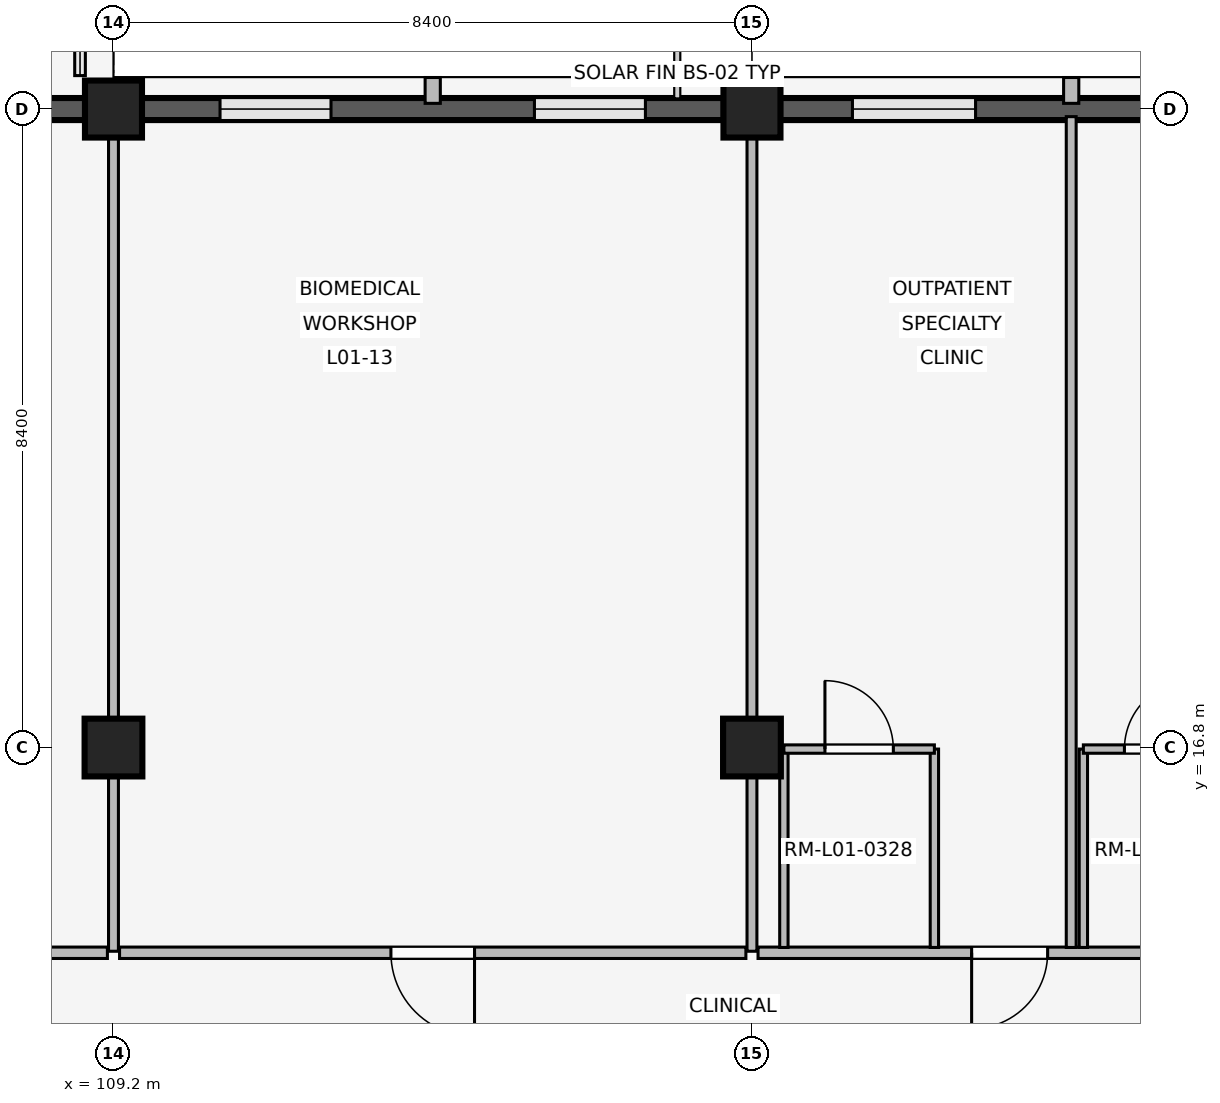
"""IFC4 building model, lengths in metres.
Left out: names, types, materials, properties, quantities, classifications, styles, units other than length and angle.
Written with IfcOpenShell. Run it as: python <this file> out.ifc"""

import sys

from ifc_helpers import new_model, si_unit, direction, frame, frame_2d, origin, origin_2d, place, context, subcontext, project, spatial, rectangle, extrude, element, fill, save


model = new_model("IFC4")
c1 = context("Model", 3, precision=1e-05, world=origin(), true_north=direction((0.0, 1.0)))
c2 = subcontext(c1, "Body", "Model", "MODEL_VIEW")
j1 = project(units=[si_unit("LENGTHUNIT", "METRE"), si_unit("PLANEANGLEUNIT", "RADIAN")], contexts=[c1])
p1 = place(None, origin())
s1 = spatial("IfcSite", under=j1, at=p1, CompositionType="ELEMENT")
p2 = place(p1, origin())
s2 = spatial("IfcBuilding", under=s1, at=p2, CompositionType="ELEMENT")
p3 = place(p2, frame((0.0, 0.0, 4.8)))
s3 = spatial("IfcBuildingStorey", under=s2, at=p3, CompositionType="ELEMENT", Elevation=4.8)
p4 = place(p3, frame((109.2, 16.8, 0.0), z_axis=(0.0, 0.0, 1.0), x_axis=(1.0, 0.0, 0.0)))
e1 = element("IfcColumn", 1, at=p4, inside=s3, PredefinedType="COLUMN", context=c2, shape_type="SweptSolid", body=[
    extrude(rectangle(XDim=0.76, YDim=0.76, at=origin_2d()), origin(), (0.0, 0.0, 1.0), 3.3),
])
p5 = place(p3, frame((109.2, 25.2, 0.0), z_axis=(0.0, 0.0, 1.0), x_axis=(1.0, 0.0, 0.0)))
e2 = element("IfcColumn", 2, at=p5, inside=s3, PredefinedType="COLUMN", context=c2, shape_type="SweptSolid", body=[
    extrude(rectangle(XDim=0.75, YDim=0.75, at=origin_2d()), origin(), (0.0, 0.0, 1.0), 3.3),
])
p6 = place(p3, frame((117.6, 16.8, 0.0), z_axis=(0.0, 0.0, 1.0), x_axis=(1.0, 0.0, 0.0)))
e3 = element("IfcColumn", 3, at=p6, inside=s3, PredefinedType="COLUMN", context=c2, shape_type="SweptSolid", body=[
    extrude(rectangle(XDim=0.76, YDim=0.76, at=origin_2d()), origin(), (0.0, 0.0, 1.0), 3.3),
])
p7 = place(p3, frame((117.6, 25.2, 0.0), z_axis=(0.0, 0.0, 1.0), x_axis=(1.0, 0.0, 0.0)))
e4 = element("IfcColumn", 4, at=p7, inside=s3, PredefinedType="COLUMN", context=c2, shape_type="SweptSolid", body=[
    extrude(rectangle(XDim=0.75, YDim=0.75, at=origin_2d()), origin(), (0.0, 0.0, 1.0), 3.3),
])
p8 = place(p3, frame((101.17, 25.2, 0.0), z_axis=(0.0, 0.0, 1.0), x_axis=(1.0, 0.0, 0.0)))
e5 = element("IfcWall", 5, at=p8, inside=s3, PredefinedType="SOLIDWALL", context=c2, shape_type="SweptSolid", body=[
    extrude(rectangle(XDim=7.66, YDim=0.29, at=frame_2d((3.83, 0.0))), origin(), (0.0, 0.0, 1.0), 2.42),
])
p9 = place(p8, frame((2.88, 0.0, 0.0)))
e6 = element("IfcOpeningElement", 6, at=p9, cuts=e5, PredefinedType="OPENING", context=c2, shape_type="SweptSolid", body=[
    extrude(rectangle(XDim=1.9, YDim=2.3, at=frame_2d((0.95, 1.15))), frame((0.0, 0.155, 0.0), z_axis=(0.0, -1.0, 0.0), x_axis=(1.0, 0.0, 0.0)), (0.0, 0.0, 1.0), 0.31),
])
p10 = place(p3, frame((109.57, 25.2, 0.0), z_axis=(0.0, 0.0, 1.0), x_axis=(1.0, 0.0, 0.0)))
e7 = element("IfcWall", 7, at=p10, inside=s3, PredefinedType="SOLIDWALL", context=c2, shape_type="SweptSolid", body=[
    extrude(rectangle(XDim=7.66, YDim=0.29, at=frame_2d((3.83, 0.0))), origin(), (0.0, 0.0, 1.0), 2.42),
])
p11 = place(p10, frame((1.032, 0.0, 0.85)))
e8 = element("IfcOpeningElement", 8, at=p11, cuts=e7, PredefinedType="OPENING", context=c2, shape_type="SweptSolid", body=[
    extrude(rectangle(XDim=1.46, YDim=0.85, at=frame_2d((0.73, 0.425))), frame((0.0, 0.155, 0.0), z_axis=(0.0, -1.0, 0.0), x_axis=(1.0, 0.0, 0.0)), (0.0, 0.0, 1.0), 0.31),
])
p12 = place(p10, frame((5.168, 0.0, 0.85)))
e9 = element("IfcOpeningElement", 9, at=p12, cuts=e7, PredefinedType="OPENING", context=c2, shape_type="SweptSolid", body=[
    extrude(rectangle(XDim=1.46, YDim=0.85, at=frame_2d((0.73, 0.425))), frame((0.0, 0.155, 0.0), z_axis=(0.0, -1.0, 0.0), x_axis=(1.0, 0.0, 0.0)), (0.0, 0.0, 1.0), 0.31),
])
p13 = place(p3, frame((113.4, 25.275, 0.0), z_axis=(0.0, 0.0, 1.0), x_axis=(0.0, 1.0, 0.0)))
e10 = element("IfcWall", 10, at=p13, inside=s3, PredefinedType="ELEMENTEDWALL", context=c2, shape_type="SweptSolid", body=[
    extrude(rectangle(XDim=0.34, YDim=0.2, at=frame_2d((0.17, 0.0))), origin(), (0.0, 0.0, 1.0), 2.4),
])
p14 = place(p3, frame((117.97, 25.2, 0.0), z_axis=(0.0, 0.0, 1.0), x_axis=(1.0, 0.0, 0.0)))
e11 = element("IfcWall", 11, at=p14, inside=s3, PredefinedType="SOLIDWALL", context=c2, shape_type="SweptSolid", body=[
    extrude(rectangle(XDim=7.66, YDim=0.29, at=frame_2d((3.83, 0.0))), origin(), (0.0, 0.0, 1.0), 2.42),
])
p15 = place(p14, frame((0.952, 0.0, 0.85)))
e12 = element("IfcOpeningElement", 12, at=p15, cuts=e11, PredefinedType="OPENING", context=c2, shape_type="SweptSolid", body=[
    extrude(rectangle(XDim=1.62, YDim=0.95, at=frame_2d((0.81, 0.475))), frame((0.0, 0.155, 0.0), z_axis=(0.0, -1.0, 0.0), x_axis=(1.0, 0.0, 0.0)), (0.0, 0.0, 1.0), 0.31),
])
p16 = place(p14, frame((5.088, 0.0, 0.85)))
e13 = element("IfcOpeningElement", 13, at=p16, cuts=e11, PredefinedType="OPENING", context=c2, shape_type="SweptSolid", body=[
    extrude(rectangle(XDim=1.62, YDim=0.95, at=frame_2d((0.81, 0.475))), frame((0.0, 0.155, 0.0), z_axis=(0.0, -1.0, 0.0), x_axis=(1.0, 0.0, 0.0)), (0.0, 0.0, 1.0), 0.31),
])
p17 = place(p3, frame((121.8, 25.275, 0.0), z_axis=(0.0, 0.0, 1.0), x_axis=(0.0, 1.0, 0.0)))
e14 = element("IfcWall", 14, at=p17, inside=s3, PredefinedType="ELEMENTEDWALL", context=c2, shape_type="SweptSolid", body=[
    extrude(rectangle(XDim=0.34, YDim=0.2, at=frame_2d((0.17, 0.0))), origin(), (0.0, 0.0, 1.0), 2.4),
])
p18 = place(p3, frame((109.12, 14.1, 0.0), z_axis=(0.0, 0.0, 1.0), x_axis=(-1.0, 0.0, 0.0)))
e15 = element("IfcWall", 15, at=p18, inside=s3, PredefinedType="PARTITIONING", context=c2, shape_type="SweptSolid", body=[
    extrude(rectangle(XDim=7.96, YDim=0.15, at=frame_2d((3.98, 0.0))), origin(), (0.0, 0.0, 1.0), 2.4),
])
p19 = place(p18, frame((1.15, 0.0, 0.0)))
e16 = element("IfcOpeningElement", 16, at=p19, cuts=e15, PredefinedType="OPENING", context=c2, shape_type="SweptSolid", body=[
    extrude(rectangle(XDim=1.9, YDim=2.3, at=frame_2d((0.95, 1.15))), frame((0.0, 0.085, 0.0), z_axis=(0.0, -1.0, 0.0), x_axis=(1.0, 0.0, 0.0)), (0.0, 0.0, 1.0), 0.17),
])
p20 = place(p3, frame((109.2, 14.12, 0.0), z_axis=(0.0, 0.0, 1.0), x_axis=(0.0, 1.0, 0.0)))
e17 = element("IfcWall", 17, at=p20, inside=s3, PredefinedType="PARTITIONING", context=c2, shape_type="SweptSolid", body=[
    extrude(rectangle(XDim=10.94, YDim=0.13, at=frame_2d((5.47, 0.0))), origin(), (0.0, 0.0, 1.0), 2.4),
])
p21 = place(p3, frame((117.52, 14.1, 0.0), z_axis=(0.0, 0.0, 1.0), x_axis=(-1.0, 0.0, 0.0)))
e18 = element("IfcWall", 18, at=p21, inside=s3, PredefinedType="PARTITIONING", context=c2, shape_type="SweptSolid", body=[
    extrude(rectangle(XDim=8.24, YDim=0.15, at=frame_2d((4.12, 0.0))), origin(), (0.0, 0.0, 1.0), 2.4),
])
p22 = place(p21, frame((3.57, 0.0, 0.0)))
e19 = element("IfcOpeningElement", 19, at=p22, cuts=e18, PredefinedType="OPENING", context=c2, shape_type="SweptSolid", body=[
    extrude(rectangle(XDim=1.1, YDim=2.2, at=frame_2d((0.55, 1.1))), frame((0.0, 0.085, 0.0), z_axis=(0.0, -1.0, 0.0), x_axis=(1.0, 0.0, 0.0)), (0.0, 0.0, 1.0), 0.17),
])
p23 = place(p3, frame((117.6, 14.12, 0.0), z_axis=(0.0, 0.0, 1.0), x_axis=(0.0, 1.0, 0.0)))
e20 = element("IfcWall", 20, at=p23, inside=s3, PredefinedType="PARTITIONING", context=c2, shape_type="SweptSolid", body=[
    extrude(rectangle(XDim=10.94, YDim=0.13, at=frame_2d((5.47, 0.0))), origin(), (0.0, 0.0, 1.0), 2.4),
])
p24 = place(p3, frame((125.92, 14.1, 0.0), z_axis=(0.0, 0.0, 1.0), x_axis=(-1.0, 0.0, 0.0)))
e21 = element("IfcWall", 21, at=p24, inside=s3, PredefinedType="PARTITIONING", context=c2, shape_type="SweptSolid", body=[
    extrude(rectangle(XDim=8.24, YDim=0.15, at=frame_2d((4.12, 0.0))), origin(), (0.0, 0.0, 1.0), 2.4),
])
p25 = place(p24, frame((0.73, 0.0, 0.0)))
e22 = element("IfcOpeningElement", 22, at=p25, cuts=e21, PredefinedType="OPENING", context=c2, shape_type="SweptSolid", body=[
    extrude(rectangle(XDim=1.0, YDim=2.15, at=frame_2d((0.5, 1.075))), frame((0.0, 0.085, 0.0), z_axis=(0.0, -1.0, 0.0), x_axis=(1.0, 0.0, 0.0)), (0.0, 0.0, 1.0), 0.17),
])
p26 = place(p24, frame((4.43, 0.0, 0.0)))
e23 = element("IfcOpeningElement", 23, at=p26, cuts=e21, PredefinedType="OPENING", context=c2, shape_type="SweptSolid", body=[
    extrude(rectangle(XDim=1.0, YDim=2.15, at=frame_2d((0.5, 1.075))), frame((0.0, 0.085, 0.0), z_axis=(0.0, -1.0, 0.0), x_axis=(1.0, 0.0, 0.0)), (0.0, 0.0, 1.0), 0.17),
])
p27 = place(p3, frame((121.8, 14.17, 0.0), z_axis=(0.0, 0.0, 1.0), x_axis=(0.0, 1.0, 0.0)))
e24 = element("IfcWall", 24, at=p27, inside=s3, PredefinedType="PARTITIONING", context=c2, shape_type="SweptSolid", body=[
    extrude(rectangle(XDim=10.93, YDim=0.13, at=frame_2d((5.465, 0.0))), origin(), (0.0, 0.0, 1.0), 2.4),
])
for number, where, z_axis, x_axis in (
    (25, (118.02, 14.17, 0.0), (0.0, 0.0, 1.0), (0.0, 1.0, 0.0)),
    (26, (120.0, 14.17, 0.0), (0.0, 0.0, 1.0), (0.0, 1.0, 0.0)),
):
    element("IfcWall", number, at=place(p3, frame(where, z_axis=z_axis, x_axis=x_axis)), inside=s3, PredefinedType="PARTITIONING", context=c2, shape_type="SweptSolid", body=[
        extrude(rectangle(XDim=2.61, YDim=0.11, at=frame_2d((1.305, 0.0))), origin(), (0.0, 0.0, 1.0), 2.4),
    ])
p28 = place(p3, frame((118.02, 16.78, 0.0), z_axis=(0.0, 0.0, 1.0), x_axis=(1.0, 0.0, 0.0)))
e27 = element("IfcWall", 27, at=p28, inside=s3, PredefinedType="PARTITIONING", context=c2, shape_type="SweptSolid", body=[
    extrude(rectangle(XDim=1.98, YDim=0.11, at=frame_2d((0.99, 0.0))), origin(), (0.0, 0.0, 1.0), 2.4),
])
p29 = place(p28, frame((0.54, 0.0, 0.0)))
e28 = element("IfcOpeningElement", 28, at=p29, cuts=e27, PredefinedType="OPENING", context=c2, shape_type="SweptSolid", body=[
    extrude(rectangle(XDim=0.9, YDim=2.1, at=frame_2d((0.45, 1.05))), frame((0.0, 0.065, 0.0), z_axis=(0.0, -1.0, 0.0), x_axis=(1.0, 0.0, 0.0)), (0.0, 0.0, 1.0), 0.13),
])
p30 = place(p3, frame((121.96, 14.17, 0.0), z_axis=(0.0, 0.0, 1.0), x_axis=(0.0, 1.0, 0.0)))
e29 = element("IfcWall", 29, at=p30, inside=s3, PredefinedType="PARTITIONING", context=c2, shape_type="SweptSolid", body=[
    extrude(rectangle(XDim=2.61, YDim=0.11, at=frame_2d((1.305, 0.0))), origin(), (0.0, 0.0, 1.0), 2.4),
])
p31 = place(p3, frame((121.96, 16.78, 0.0), z_axis=(0.0, 0.0, 1.0), x_axis=(1.0, 0.0, 0.0)))
e30 = element("IfcWall", 30, at=p31, inside=s3, PredefinedType="PARTITIONING", context=c2, shape_type="SweptSolid", body=[
    extrude(rectangle(XDim=1.98, YDim=0.11, at=frame_2d((0.99, 0.0))), origin(), (0.0, 0.0, 1.0), 2.4),
])
p32 = place(p31, frame((0.54, 0.0, 0.0)))
e31 = element("IfcOpeningElement", 31, at=p32, cuts=e30, PredefinedType="OPENING", context=c2, shape_type="SweptSolid", body=[
    extrude(rectangle(XDim=0.9, YDim=2.1, at=frame_2d((0.45, 1.05))), frame((0.0, 0.065, 0.0), z_axis=(0.0, -1.0, 0.0), x_axis=(1.0, 0.0, 0.0)), (0.0, 0.0, 1.0), 0.13),
])
p33 = place(p11, origin())
e32 = element("IfcWindow", 32, at=p33, inside=s3, PartitioningType="SINGLE_PANEL", PredefinedType="WINDOW", context=c2, shape_type="SweptSolid", body=[
    extrude(rectangle(XDim=1.46, YDim=0.85, at=frame_2d((0.73, 0.425))), frame((0.0, 0.03, 0.0), z_axis=(0.0, -1.0, 0.0), x_axis=(1.0, 0.0, 0.0)), (0.0, 0.0, 1.0), 0.06),
])
fill(e8, e32)
p34 = place(p12, origin())
e33 = element("IfcWindow", 33, at=p34, inside=s3, PartitioningType="SINGLE_PANEL", PredefinedType="WINDOW", context=c2, shape_type="SweptSolid", body=[
    extrude(rectangle(XDim=1.46, YDim=0.85, at=frame_2d((0.73, 0.425))), frame((0.0, 0.03, 0.0), z_axis=(0.0, -1.0, 0.0), x_axis=(1.0, 0.0, 0.0)), (0.0, 0.0, 1.0), 0.06),
])
fill(e9, e33)
p35 = place(p15, origin())
e34 = element("IfcWindow", 34, at=p35, inside=s3, PartitioningType="SINGLE_PANEL", PredefinedType="WINDOW", context=c2, shape_type="SweptSolid", body=[
    extrude(rectangle(XDim=1.62, YDim=0.95, at=frame_2d((0.81, 0.475))), frame((0.0, 0.03, 0.0), z_axis=(0.0, -1.0, 0.0), x_axis=(1.0, 0.0, 0.0)), (0.0, 0.0, 1.0), 0.06),
])
fill(e12, e34)
p36 = place(p22, origin())
e35 = element("IfcDoor", 35, at=p36, inside=s3, OperationType="SINGLE_SWING_LEFT", PredefinedType="DOOR", context=c2, shape_type="SweptSolid", body=[
    extrude(rectangle(XDim=1.1, YDim=2.2, at=frame_2d((0.55, 1.1))), frame((0.0, 0.025, 0.0), z_axis=(0.0, -1.0, 0.0), x_axis=(1.0, 0.0, 0.0)), (0.0, 0.0, 1.0), 0.05),
])
fill(e19, e35)
p37 = place(p26, origin())
e36 = element("IfcDoor", 36, at=p37, inside=s3, OperationType="SINGLE_SWING_RIGHT", PredefinedType="DOOR", context=c2, shape_type="SweptSolid", body=[
    extrude(rectangle(XDim=1.0, YDim=2.15, at=frame_2d((0.5, 1.075))), frame((0.0, 0.025, 0.0), z_axis=(0.0, -1.0, 0.0), x_axis=(1.0, 0.0, 0.0)), (0.0, 0.0, 1.0), 0.05),
])
fill(e23, e36)
p38 = place(p29, origin())
e37 = element("IfcDoor", 37, at=p38, inside=s3, OperationType="SINGLE_SWING_LEFT", PredefinedType="DOOR", context=c2, shape_type="SweptSolid", body=[
    extrude(rectangle(XDim=0.9, YDim=2.1, at=frame_2d((0.45, 1.05))), frame((0.0, 0.025, 0.0), z_axis=(0.0, -1.0, 0.0), x_axis=(1.0, 0.0, 0.0)), (0.0, 0.0, 1.0), 0.05),
])
fill(e28, e37)
p39 = place(p32, origin())
e38 = element("IfcDoor", 38, at=p39, inside=s3, OperationType="SINGLE_SWING_RIGHT", PredefinedType="DOOR", context=c2, shape_type="SweptSolid", body=[
    extrude(rectangle(XDim=0.9, YDim=2.1, at=frame_2d((0.45, 1.05))), frame((0.0, 0.025, 0.0), z_axis=(0.0, -1.0, 0.0), x_axis=(1.0, 0.0, 0.0)), (0.0, 0.0, 1.0), 0.05),
])
fill(e31, e38)
save(model, sys.argv[1])
